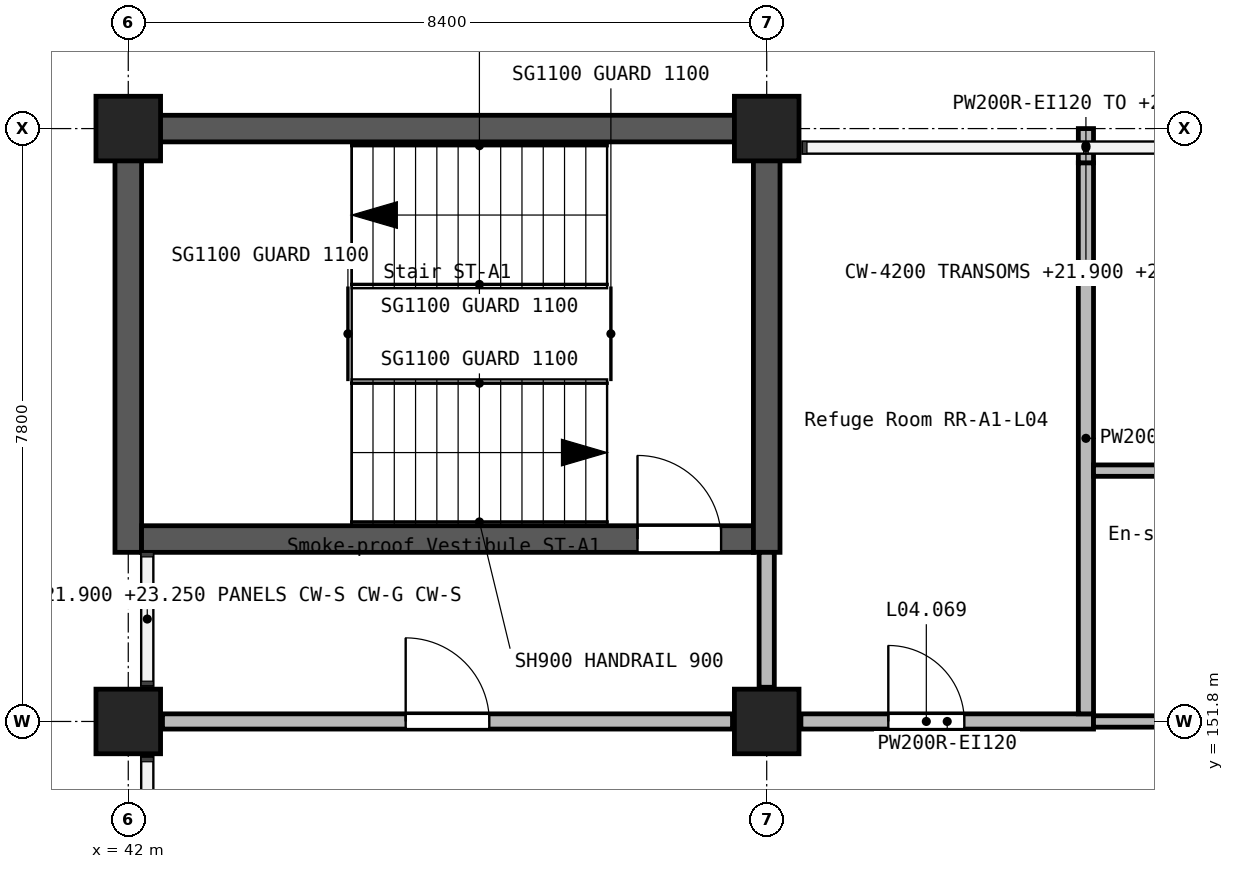
"""IFC4 building model, lengths in metres.
Left out: names, types, materials, properties, quantities, classifications, styles, units other than length and angle.
Written with IfcOpenShell. Run it as: python <this file> out.ifc"""

import sys

from ifc_helpers import new_model, si_unit, direction, frame, frame_2d, origin, origin_2d, place, context, subcontext, project, spatial, rectangle, extrude, element, fill, save


model = new_model("IFC4")
c1 = context("Model", 3, precision=1e-05, world=origin(), true_north=direction((0.0, 1.0)))
c2 = subcontext(c1, "Body", "Model", "MODEL_VIEW")
j1 = project(units=[si_unit("LENGTHUNIT", "METRE"), si_unit("PLANEANGLEUNIT", "RADIAN")], contexts=[c1])
p1 = place(None, origin())
s1 = spatial("IfcSite", under=j1, at=p1, CompositionType="ELEMENT")
p2 = place(p1, origin())
s2 = spatial("IfcBuilding", under=s1, at=p2, CompositionType="ELEMENT")
p3 = place(p2, frame((0.0, 0.0, 21.0)))
s3 = spatial("IfcBuildingStorey", under=s2, at=p3, CompositionType="ELEMENT", Elevation=21.0)
for number, where, z_axis, x_axis in (
    (1, (42.0, 151.8, 0.0), (0.0, 0.0, 1.0), (1.0, 0.0, 0.0)),
    (2, (42.0, 159.6, 0.0), (0.0, 0.0, 1.0), (1.0, 0.0, 0.0)),
    (3, (50.4, 151.8, 0.0), (0.0, 0.0, 1.0), (1.0, 0.0, 0.0)),
    (4, (50.4, 159.6, 0.0), (0.0, 0.0, 1.0), (1.0, 0.0, 0.0)),
):
    element("IfcColumn", number, at=place(p3, frame(where, z_axis=z_axis, x_axis=x_axis)), inside=s3, PredefinedType="COLUMN", context=c2, shape_type="SweptSolid", body=[
        extrude(rectangle(XDim=0.85, YDim=0.85, at=origin_2d()), origin(), (0.0, 0.0, 1.0), 3.9),
    ])
p4 = place(p3, frame((41.825, 159.6, 0.0), z_axis=(0.0, 0.0, 1.0), x_axis=(1.0, 0.0, 0.0)))
e5 = element("IfcWall", 5, at=p4, inside=s3, PredefinedType="SHEAR", context=c2, shape_type="SweptSolid", body=[
    extrude(rectangle(XDim=8.4, YDim=0.35, at=frame_2d((4.2, 0.0))), origin(), (0.0, 0.0, 1.0), 3.9),
])
p5 = place(p3, frame((42.0, 154.025, 0.0), z_axis=(0.0, 0.0, 1.0), x_axis=(0.0, 1.0, 0.0)))
e6 = element("IfcWall", 6, at=p5, inside=s3, PredefinedType="SHEAR", context=c2, shape_type="SweptSolid", body=[
    extrude(rectangle(XDim=5.4, YDim=0.35, at=frame_2d((2.7, 0.0))), origin(), (0.0, 0.0, 1.0), 3.9),
])
p6 = place(p3, frame((42.175, 154.2, 0.0), z_axis=(0.0, 0.0, 1.0), x_axis=(1.0, 0.0, 0.0)))
e7 = element("IfcWall", 7, at=p6, inside=s3, PredefinedType="SHEAR", context=c2, shape_type="SweptSolid", body=[
    extrude(rectangle(XDim=8.05, YDim=0.35, at=frame_2d((4.025, 0.0))), origin(), (0.0, 0.0, 1.0), 3.9),
])
p7 = place(p6, frame((6.525, 0.0, 0.0)))
e8 = element("IfcOpeningElement", 8, at=p7, cuts=e7, PredefinedType="OPENING", context=c2, shape_type="SweptSolid", body=[
    extrude(rectangle(XDim=1.1, YDim=2.1, at=frame_2d((0.55, 1.05))), frame((0.0, 0.185, 0.0), z_axis=(0.0, -1.0, 0.0), x_axis=(1.0, 0.0, 0.0)), (0.0, 0.0, 1.0), 0.37),
])
p8 = place(p3, frame((50.4, 154.025, 0.0), z_axis=(0.0, 0.0, 1.0), x_axis=(0.0, 1.0, 0.0)))
e9 = element("IfcWall", 9, at=p8, inside=s3, PredefinedType="SHEAR", context=c2, shape_type="SweptSolid", body=[
    extrude(rectangle(XDim=5.75, YDim=0.35, at=frame_2d((2.875, 0.0))), origin(), (0.0, 0.0, 1.0), 3.9),
])
p9 = place(p3, frame((42.45, 151.8, 0.0), z_axis=(0.0, 0.0, 1.0), x_axis=(1.0, 0.0, 0.0)))
e10 = element("IfcWall", 10, at=p9, inside=s3, PredefinedType="SOLIDWALL", context=c2, shape_type="SweptSolid", body=[
    extrude(rectangle(XDim=7.5, YDim=0.2, at=frame_2d((3.75, 0.0))), origin(), (0.0, 0.0, 1.0), 3.6),
])
p10 = place(p9, frame((3.2, 0.0, 0.0)))
e11 = element("IfcOpeningElement", 11, at=p10, cuts=e10, PredefinedType="OPENING", context=c2, shape_type="SweptSolid", body=[
    extrude(rectangle(XDim=1.1, YDim=2.1, at=frame_2d((0.55, 1.05))), frame((0.0, 0.11, 0.0), z_axis=(0.0, -1.0, 0.0), x_axis=(1.0, 0.0, 0.0)), (0.0, 0.0, 1.0), 0.22),
])
p11 = place(p3, frame((50.85, 151.8, 0.0), z_axis=(0.0, 0.0, 1.0), x_axis=(1.0, 0.0, 0.0)))
e12 = element("IfcWall", 12, at=p11, inside=s3, PredefinedType="SOLIDWALL", context=c2, shape_type="SweptSolid", body=[
    extrude(rectangle(XDim=3.85, YDim=0.2, at=frame_2d((1.925, 0.0))), origin(), (0.0, 0.0, 1.0), 3.6),
])
p12 = place(p11, frame((1.15, 0.0, 0.0)))
e13 = element("IfcOpeningElement", 13, at=p12, cuts=e12, PredefinedType="OPENING", context=c2, shape_type="SweptSolid", body=[
    extrude(rectangle(XDim=1.0, YDim=2.1, at=frame_2d((0.5, 1.05))), frame((0.0, 0.11, 0.0), z_axis=(0.0, -1.0, 0.0), x_axis=(1.0, 0.0, 0.0)), (0.0, 0.0, 1.0), 0.22),
])
p13 = place(p3, frame((50.4, 152.25, 0.0), z_axis=(0.0, 0.0, 1.0), x_axis=(0.0, 1.0, 0.0)))
e14 = element("IfcWall", 14, at=p13, inside=s3, PredefinedType="SOLIDWALL", context=c2, shape_type="SweptSolid", body=[
    extrude(rectangle(XDim=1.775, YDim=0.2, at=frame_2d((0.887, 0.0))), origin(), (0.0, 0.0, 1.0), 3.6),
])
p14 = place(p3, frame((54.6, 151.9, 0.0), z_axis=(0.0, 0.0, 1.0), x_axis=(0.0, 1.0, 0.0)))
e15 = element("IfcWall", 15, at=p14, inside=s3, PredefinedType="SOLIDWALL", context=c2, shape_type="SweptSolid", body=[
    extrude(rectangle(XDim=7.25, YDim=0.2, at=frame_2d((3.625, 0.0))), origin(), (0.0, 0.0, 1.0), 3.6),
])
p15 = place(p3, frame((54.6, 159.15, 0.0), z_axis=(0.0, 0.0, 1.0), x_axis=(0.0, 1.0, 0.0)))
e16 = element("IfcWall", 16, at=p15, inside=s3, PredefinedType="SOLIDWALL", context=c2, shape_type="SweptSolid", body=[
    extrude(rectangle(XDim=0.45, YDim=0.2, at=frame_2d((0.225, 0.0))), origin(), (0.0, 0.0, 1.0), 2.78),
])
p16 = place(p3, frame((54.7, 151.8, 0.0), z_axis=(0.0, 0.0, 1.0), x_axis=(1.0, 0.0, 0.0)))
e17 = element("IfcWall", 17, at=p16, inside=s3, PredefinedType="PARTITIONING", context=c2, shape_type="SweptSolid", body=[
    extrude(rectangle(XDim=3.65, YDim=0.15, at=frame_2d((1.825, 0.0))), origin(), (0.0, 0.0, 1.0), 3.6),
])
p17 = place(p3, frame((54.7, 155.1, 0.0), z_axis=(0.0, 0.0, 1.0), x_axis=(1.0, 0.0, 0.0)))
e18 = element("IfcWall", 18, at=p17, inside=s3, PredefinedType="PARTITIONING", context=c2, shape_type="SweptSolid", body=[
    extrude(rectangle(XDim=2.525, YDim=0.15, at=frame_2d((1.263, 0.0))), origin(), (0.0, 0.0, 1.0), 3.6),
])
p18 = place(p12, origin())
e19 = element("IfcDoor", 19, at=p18, inside=s3, OperationType="SINGLE_SWING_LEFT", PredefinedType="DOOR", context=c2, shape_type="SweptSolid", body=[
    extrude(rectangle(XDim=1.0, YDim=2.1, at=frame_2d((0.5, 1.05))), frame((0.0, 0.025, 0.0), z_axis=(0.0, -1.0, 0.0), x_axis=(1.0, 0.0, 0.0)), (0.0, 0.0, 1.0), 0.05),
])
fill(e13, e19)
p19 = place(p7, origin())
e20 = element("IfcDoor", 20, at=p19, inside=s3, OperationType="SINGLE_SWING_RIGHT", PredefinedType="DOOR", context=c2, shape_type="SweptSolid", body=[
    extrude(rectangle(XDim=1.1, YDim=2.1, at=frame_2d((0.55, 1.05))), frame((0.0, 0.025, 0.0), z_axis=(0.0, -1.0, 0.0), x_axis=(1.0, 0.0, 0.0)), (0.0, 0.0, 1.0), 0.05),
])
fill(e8, e20)
p20 = place(p10, origin())
e21 = element("IfcDoor", 21, at=p20, inside=s3, OperationType="SINGLE_SWING_RIGHT", PredefinedType="DOOR", context=c2, shape_type="SweptSolid", body=[
    extrude(rectangle(XDim=1.1, YDim=2.1, at=frame_2d((0.55, 1.05))), frame((0.0, 0.025, 0.0), z_axis=(0.0, -1.0, 0.0), x_axis=(1.0, 0.0, 0.0)), (0.0, 0.0, 1.0), 0.05),
])
fill(e11, e21)
save(model, sys.argv[1])
